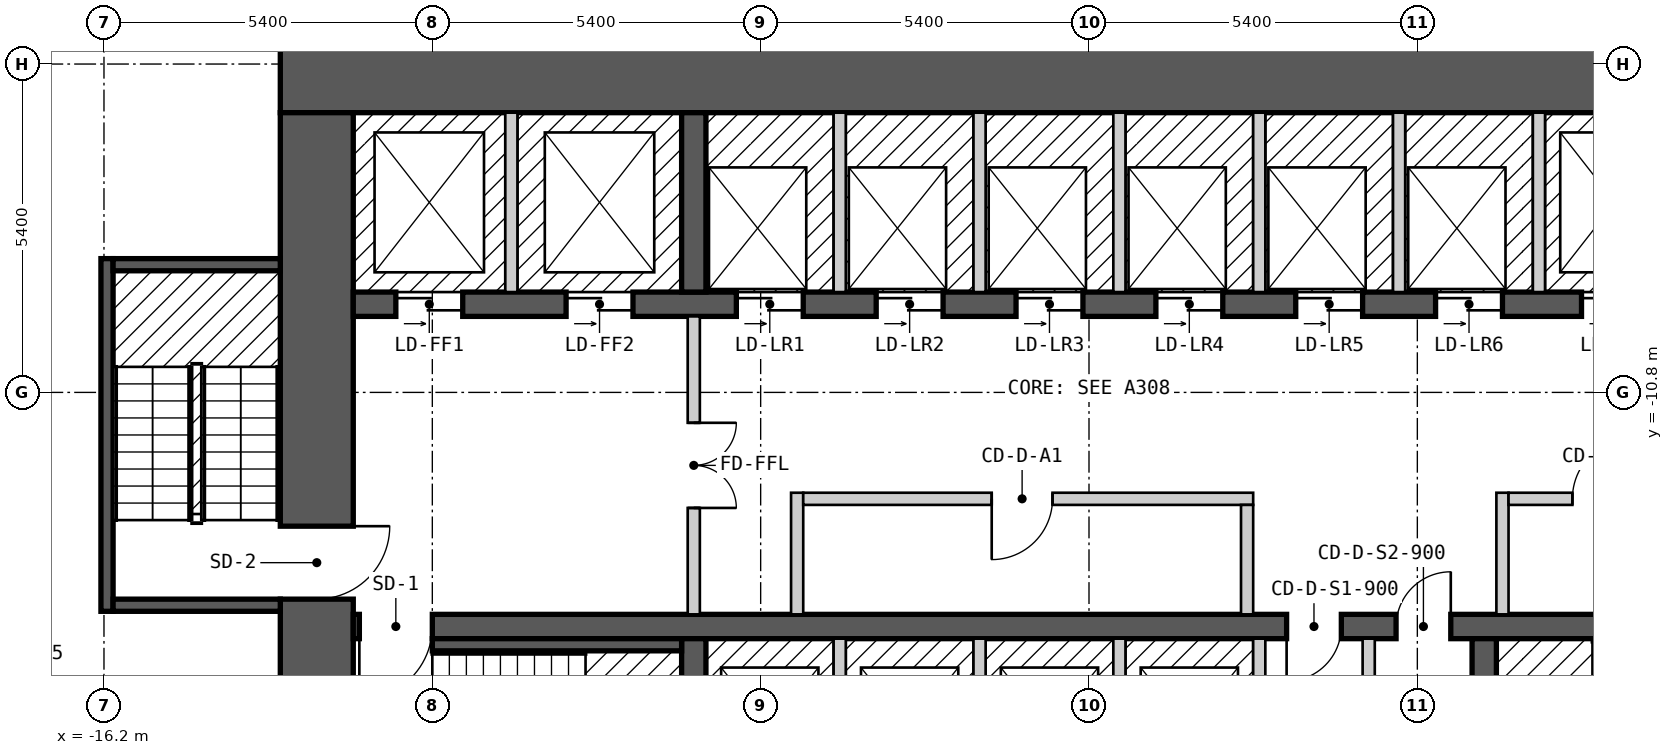
"""IFC4 building model, lengths in metres.
Left out: names, types, materials, properties, quantities, classifications, styles, units other than length and angle.
Written with IfcOpenShell. Run it as: python <this file> out.ifc"""

import sys

from ifc_helpers import new_model, si_unit, direction, frame, frame_2d, origin, place, context, subcontext, project, spatial, rectangle, extrude, element, fill, save


model = new_model("IFC4")
c1 = context("Model", 3, precision=1e-05, world=origin(), true_north=direction((0.0, 1.0)))
c2 = subcontext(c1, "Body", "Model", "MODEL_VIEW")
j1 = project(units=[si_unit("LENGTHUNIT", "METRE"), si_unit("PLANEANGLEUNIT", "RADIAN")], contexts=[c1])
p1 = place(None, origin())
s1 = spatial("IfcSite", under=j1, at=p1, CompositionType="ELEMENT")
p2 = place(p1, origin())
s2 = spatial("IfcBuilding", under=s1, at=p2, CompositionType="ELEMENT")
p3 = place(p2, frame((0.0, 0.0, 19.8)))
s3 = spatial("IfcBuildingStorey", under=s2, at=p3, CompositionType="ELEMENT", Elevation=19.8)
p4 = place(p3, frame((-13.3, -5.6, 0.0), z_axis=(0.0, 0.0, 1.0), x_axis=(1.0, 0.0, 0.0)))
e1 = element("IfcWall", 1, at=p4, inside=s3, PredefinedType="SHEAR", context=c2, shape_type="SweptSolid", body=[
    extrude(rectangle(XDim=26.6, YDim=1.2, at=frame_2d((13.3, 0.0))), origin(), (0.0, 0.0, 1.0), 2.8),
])
p5 = place(p4, frame((23.65, 0.0, 0.0)))
e2 = element("IfcOpeningElement", 2, at=p5, cuts=e1, PredefinedType="OPENING", context=c2, shape_type="SweptSolid", body=[
    extrude(rectangle(XDim=1.2, YDim=2.1, at=frame_2d((0.6, 1.05))), frame((0.0, 0.61, 0.0), z_axis=(0.0, -1.0, 0.0), x_axis=(1.0, 0.0, 0.0)), (0.0, 0.0, 1.0), 1.22),
])
p6 = place(p3, frame((-12.7, -17.8, 0.0), z_axis=(0.0, 0.0, 1.0), x_axis=(0.0, 1.0, 0.0)))
e3 = element("IfcWall", 3, at=p6, inside=s3, PredefinedType="SHEAR", context=c2, shape_type="SweptSolid", body=[
    extrude(rectangle(XDim=11.6, YDim=1.2, at=frame_2d((5.8, 0.0))), origin(), (0.0, 0.0, 1.0), 2.8),
])
p7 = place(p6, frame((3.6, 0.0, 0.0)))
e4 = element("IfcOpeningElement", 4, at=p7, cuts=e3, PredefinedType="OPENING", context=c2, shape_type="SweptSolid", body=[
    extrude(rectangle(XDim=1.2, YDim=2.1, at=frame_2d((0.6, 1.05))), frame((0.0, 0.61, 0.0), z_axis=(0.0, -1.0, 0.0), x_axis=(1.0, 0.0, 0.0)), (0.0, 0.0, 1.0), 1.22),
])
p8 = place(p3, frame((-12.1, -14.65, 0.0), z_axis=(0.0, 0.0, 1.0), x_axis=(1.0, 0.0, 0.0)))
e5 = element("IfcWall", 5, at=p8, inside=s3, PredefinedType="SHEAR", context=c2, shape_type="SweptSolid", body=[
    extrude(rectangle(XDim=24.2, YDim=0.4, at=frame_2d((12.1, 0.0))), origin(), (0.0, 0.0, 1.0), 2.8),
])
p9 = place(p8, frame((1.3, 0.0, 0.0), z_axis=(0.0, 0.0, 1.0), x_axis=(-1.0, 0.0, 0.0)))
e6 = element("IfcOpeningElement", 6, at=p9, cuts=e5, PredefinedType="OPENING", context=c2, shape_type="SweptSolid", body=[
    extrude(rectangle(XDim=1.2, YDim=2.1, at=frame_2d((0.6, 1.05))), frame((0.0, 0.21, 0.0), z_axis=(0.0, -1.0, 0.0), x_axis=(1.0, 0.0, 0.0)), (0.0, 0.0, 1.0), 0.42),
])
p10 = place(p8, frame((24.15, 0.0, 0.0), z_axis=(0.0, 0.0, 1.0), x_axis=(-1.0, 0.0, 0.0)))
e7 = element("IfcOpeningElement", 7, at=p10, cuts=e5, PredefinedType="OPENING", context=c2, shape_type="SweptSolid", body=[
    extrude(rectangle(XDim=1.2, YDim=2.1, at=frame_2d((0.6, 1.05))), frame((0.0, 0.21, 0.0), z_axis=(0.0, -1.0, 0.0), x_axis=(1.0, 0.0, 0.0)), (0.0, 0.0, 1.0), 0.42),
])
p11 = place(p8, frame((16.25, 0.0, 0.0), z_axis=(0.0, 0.0, 1.0), x_axis=(-1.0, 0.0, 0.0)))
e8 = element("IfcOpeningElement", 8, at=p11, cuts=e5, PredefinedType="OPENING", context=c2, shape_type="SweptSolid", body=[
    extrude(rectangle(XDim=0.9, YDim=2.1, at=frame_2d((0.45, 1.05))), frame((0.0, 0.21, 0.0), z_axis=(0.0, -1.0, 0.0), x_axis=(1.0, 0.0, 0.0)), (0.0, 0.0, 1.0), 0.42),
])
p12 = place(p8, frame((18.05, 0.0, 0.0), z_axis=(0.0, 0.0, 1.0), x_axis=(-1.0, 0.0, 0.0)))
e9 = element("IfcOpeningElement", 9, at=p12, cuts=e5, PredefinedType="OPENING", context=c2, shape_type="SweptSolid", body=[
    extrude(rectangle(XDim=0.9, YDim=2.1, at=frame_2d((0.45, 1.05))), frame((0.0, 0.21, 0.0), z_axis=(0.0, -1.0, 0.0), x_axis=(1.0, 0.0, 0.0)), (0.0, 0.0, 1.0), 0.42),
])
p13 = place(p3, frame((-12.1, -9.35, 0.0), z_axis=(0.0, 0.0, 1.0), x_axis=(1.0, 0.0, 0.0)))
e10 = element("IfcWall", 10, at=p13, inside=s3, PredefinedType="SHEAR", context=c2, shape_type="SweptSolid", body=[
    extrude(rectangle(XDim=22.3, YDim=0.4, at=frame_2d((11.15, 0.0))), origin(), (0.0, 0.0, 1.0), 2.8),
])
p14 = place(p13, frame((0.7, 0.0, 0.0)))
e11 = element("IfcOpeningElement", 11, at=p14, cuts=e10, PredefinedType="OPENING", context=c2, shape_type="SweptSolid", body=[
    extrude(rectangle(XDim=1.1, YDim=2.1, at=frame_2d((0.55, 1.05))), frame((0.0, 0.21, 0.0), z_axis=(0.0, -1.0, 0.0), x_axis=(1.0, 0.0, 0.0)), (0.0, 0.0, 1.0), 0.42),
])
p15 = place(p13, frame((3.5, 0.0, 0.0)))
e12 = element("IfcOpeningElement", 12, at=p15, cuts=e10, PredefinedType="OPENING", context=c2, shape_type="SweptSolid", body=[
    extrude(rectangle(XDim=1.1, YDim=2.1, at=frame_2d((0.55, 1.05))), frame((0.0, 0.21, 0.0), z_axis=(0.0, -1.0, 0.0), x_axis=(1.0, 0.0, 0.0)), (0.0, 0.0, 1.0), 0.42),
])
p16 = place(p13, frame((6.3, 0.0, 0.0)))
e13 = element("IfcOpeningElement", 13, at=p16, cuts=e10, PredefinedType="OPENING", context=c2, shape_type="SweptSolid", body=[
    extrude(rectangle(XDim=1.1, YDim=2.1, at=frame_2d((0.55, 1.05))), frame((0.0, 0.21, 0.0), z_axis=(0.0, -1.0, 0.0), x_axis=(1.0, 0.0, 0.0)), (0.0, 0.0, 1.0), 0.42),
])
p17 = place(p13, frame((8.6, 0.0, 0.0)))
e14 = element("IfcOpeningElement", 14, at=p17, cuts=e10, PredefinedType="OPENING", context=c2, shape_type="SweptSolid", body=[
    extrude(rectangle(XDim=1.1, YDim=2.1, at=frame_2d((0.55, 1.05))), frame((0.0, 0.21, 0.0), z_axis=(0.0, -1.0, 0.0), x_axis=(1.0, 0.0, 0.0)), (0.0, 0.0, 1.0), 0.42),
])
p18 = place(p13, frame((10.9, 0.0, 0.0)))
e15 = element("IfcOpeningElement", 15, at=p18, cuts=e10, PredefinedType="OPENING", context=c2, shape_type="SweptSolid", body=[
    extrude(rectangle(XDim=1.1, YDim=2.1, at=frame_2d((0.55, 1.05))), frame((0.0, 0.21, 0.0), z_axis=(0.0, -1.0, 0.0), x_axis=(1.0, 0.0, 0.0)), (0.0, 0.0, 1.0), 0.42),
])
p19 = place(p13, frame((13.2, 0.0, 0.0)))
e16 = element("IfcOpeningElement", 16, at=p19, cuts=e10, PredefinedType="OPENING", context=c2, shape_type="SweptSolid", body=[
    extrude(rectangle(XDim=1.1, YDim=2.1, at=frame_2d((0.55, 1.05))), frame((0.0, 0.21, 0.0), z_axis=(0.0, -1.0, 0.0), x_axis=(1.0, 0.0, 0.0)), (0.0, 0.0, 1.0), 0.42),
])
p20 = place(p13, frame((15.5, 0.0, 0.0)))
e17 = element("IfcOpeningElement", 17, at=p20, cuts=e10, PredefinedType="OPENING", context=c2, shape_type="SweptSolid", body=[
    extrude(rectangle(XDim=1.1, YDim=2.1, at=frame_2d((0.55, 1.05))), frame((0.0, 0.21, 0.0), z_axis=(0.0, -1.0, 0.0), x_axis=(1.0, 0.0, 0.0)), (0.0, 0.0, 1.0), 0.42),
])
p21 = place(p13, frame((17.8, 0.0, 0.0)))
e18 = element("IfcOpeningElement", 18, at=p21, cuts=e10, PredefinedType="OPENING", context=c2, shape_type="SweptSolid", body=[
    extrude(rectangle(XDim=1.1, YDim=2.1, at=frame_2d((0.55, 1.05))), frame((0.0, 0.21, 0.0), z_axis=(0.0, -1.0, 0.0), x_axis=(1.0, 0.0, 0.0)), (0.0, 0.0, 1.0), 0.42),
])
p22 = place(p13, frame((20.2, 0.0, 0.0)))
e19 = element("IfcOpeningElement", 19, at=p22, cuts=e10, PredefinedType="OPENING", context=c2, shape_type="SweptSolid", body=[
    extrude(rectangle(XDim=1.1, YDim=2.1, at=frame_2d((0.55, 1.05))), frame((0.0, 0.21, 0.0), z_axis=(0.0, -1.0, 0.0), x_axis=(1.0, 0.0, 0.0)), (0.0, 0.0, 1.0), 0.42),
])
for number, where, z_axis, x_axis in (
    (20, (-6.5, -17.8, 0.0), (0.0, 0.0, 1.0), (0.0, 1.0, 0.0)),
    (21, (6.5, -17.8, 0.0), (0.0, 0.0, 1.0), (0.0, 1.0, 0.0)),
    (22, (-6.5, -9.15, 0.0), (0.0, 0.0, 1.0), (0.0, 1.0, 0.0)),
):
    element("IfcWall", number, at=place(p3, frame(where, z_axis=z_axis, x_axis=x_axis)), inside=s3, PredefinedType="SHEAR", context=c2, shape_type="SweptSolid", body=[
        extrude(rectangle(XDim=2.95, YDim=0.4, at=frame_2d((1.475, 0.0))), origin(), (0.0, 0.0, 1.0), 2.8),
    ])
p23 = place(p3, frame((-16.15, -14.4, 0.0), z_axis=(0.0, 0.0, 1.0), x_axis=(0.0, 1.0, 0.0)))
e23 = element("IfcWall", 23, at=p23, inside=s3, PredefinedType="SOLIDWALL", context=c2, shape_type="SweptSolid", body=[
    extrude(rectangle(XDim=5.8, YDim=0.2, at=frame_2d((2.9, 0.0))), origin(), (0.0, 0.0, 1.0), 2.8),
])
for number, where, z_axis, x_axis in (
    (24, (-16.05, -14.3, 0.0), (0.0, 0.0, 1.0), (1.0, 0.0, 0.0)),
    (25, (-16.05, -8.7, 0.0), (0.0, 0.0, 1.0), (1.0, 0.0, 0.0)),
):
    element("IfcWall", number, at=place(p3, frame(where, z_axis=z_axis, x_axis=x_axis)), inside=s3, PredefinedType="SOLIDWALL", context=c2, shape_type="SweptSolid", body=[
        extrude(rectangle(XDim=2.75, YDim=0.2, at=frame_2d((1.375, 0.0))), origin(), (0.0, 0.0, 1.0), 2.8),
    ])
p24 = place(p3, frame((-10.8, -14.95, 0.0), z_axis=(0.0, 0.0, 1.0), x_axis=(1.0, 0.0, 0.0)))
e26 = element("IfcWall", 26, at=p24, inside=s3, PredefinedType="SOLIDWALL", context=c2, shape_type="SweptSolid", body=[
    extrude(rectangle(XDim=4.1, YDim=0.2, at=frame_2d((2.05, 0.0))), origin(), (0.0, 0.0, 1.0), 2.8),
])
p25 = place(p3, frame((-9.5, -9.15, 0.0), z_axis=(0.0, 0.0, 1.0), x_axis=(0.0, 1.0, 0.0)))
e27 = element("IfcWall", 27, at=p25, inside=s3, PredefinedType="SOLIDWALL", context=c2, shape_type="SweptSolid", body=[
    extrude(rectangle(XDim=2.95, YDim=0.2, at=frame_2d((1.475, 0.0))), origin(), (0.0, 0.0, 1.0), 2.8),
])
p26 = place(p3, frame((-6.5, -14.45, 0.0), z_axis=(0.0, 0.0, 1.0), x_axis=(0.0, 1.0, 0.0)))
e28 = element("IfcWall", 28, at=p26, inside=s3, PredefinedType="PARTITIONING", context=c2, shape_type="SweptSolid", body=[
    extrude(rectangle(XDim=4.9, YDim=0.2, at=frame_2d((2.45, 0.0))), origin(), (0.0, 0.0, 1.0), 2.8),
])
p27 = place(p26, frame((3.15, 0.0, 0.0), z_axis=(0.0, 0.0, 1.0), x_axis=(-1.0, 0.0, 0.0)))
e29 = element("IfcOpeningElement", 29, at=p27, cuts=e28, PredefinedType="OPENING", context=c2, shape_type="SweptSolid", body=[
    extrude(rectangle(XDim=1.4, YDim=2.1, at=frame_2d((0.7, 1.05))), frame((0.0, 0.11, 0.0), z_axis=(0.0, -1.0, 0.0), x_axis=(1.0, 0.0, 0.0)), (0.0, 0.0, 1.0), 0.22),
])
p28 = place(p3, frame((-4.8, -14.45, 0.0), z_axis=(0.0, 0.0, 1.0), x_axis=(0.0, 1.0, 0.0)))
e30 = element("IfcWall", 30, at=p28, inside=s3, PredefinedType="PARTITIONING", context=c2, shape_type="SweptSolid", body=[
    extrude(rectangle(XDim=2.0, YDim=0.2, at=frame_2d((1.0, 0.0))), origin(), (0.0, 0.0, 1.0), 2.8),
])
p29 = place(p3, frame((-4.7, -12.55, 0.0), z_axis=(0.0, 0.0, 1.0), x_axis=(1.0, 0.0, 0.0)))
e31 = element("IfcWall", 31, at=p29, inside=s3, PredefinedType="PARTITIONING", context=c2, shape_type="SweptSolid", body=[
    extrude(rectangle(XDim=7.4, YDim=0.2, at=frame_2d((3.7, 0.0))), origin(), (0.0, 0.0, 1.0), 2.8),
])
p30 = place(p29, frame((4.1, 0.0, 0.0), z_axis=(0.0, 0.0, 1.0), x_axis=(-1.0, 0.0, 0.0)))
e32 = element("IfcOpeningElement", 32, at=p30, cuts=e31, PredefinedType="OPENING", context=c2, shape_type="SweptSolid", body=[
    extrude(rectangle(XDim=1.0, YDim=2.1, at=frame_2d((0.5, 1.05))), frame((0.0, 0.11, 0.0), z_axis=(0.0, -1.0, 0.0), x_axis=(1.0, 0.0, 0.0)), (0.0, 0.0, 1.0), 0.22),
])
for number, where, z_axis, x_axis in (
    (33, (-4.1, -17.8, 0.0), (0.0, 0.0, 1.0), (0.0, 1.0, 0.0)),
    (34, (-4.1, -9.15, 0.0), (0.0, 0.0, 1.0), (0.0, 1.0, 0.0)),
    (35, (-1.8, -17.8, 0.0), (0.0, 0.0, 1.0), (0.0, 1.0, 0.0)),
    (36, (-1.8, -9.15, 0.0), (0.0, 0.0, 1.0), (0.0, 1.0, 0.0)),
    (37, (0.5, -17.8, 0.0), (0.0, 0.0, 1.0), (0.0, 1.0, 0.0)),
    (38, (0.5, -9.15, 0.0), (0.0, 0.0, 1.0), (0.0, 1.0, 0.0)),
):
    element("IfcWall", number, at=place(p3, frame(where, z_axis=z_axis, x_axis=x_axis)), inside=s3, PredefinedType="SOLIDWALL", context=c2, shape_type="SweptSolid", body=[
        extrude(rectangle(XDim=2.95, YDim=0.2, at=frame_2d((1.475, 0.0))), origin(), (0.0, 0.0, 1.0), 2.8),
    ])
p31 = place(p3, frame((2.6, -14.45, 0.0), z_axis=(0.0, 0.0, 1.0), x_axis=(0.0, 1.0, 0.0)))
e39 = element("IfcWall", 39, at=p31, inside=s3, PredefinedType="PARTITIONING", context=c2, shape_type="SweptSolid", body=[
    extrude(rectangle(XDim=1.8, YDim=0.2, at=frame_2d((0.9, 0.0))), origin(), (0.0, 0.0, 1.0), 2.8),
])
for number, where, z_axis, x_axis in (
    (40, (2.8, -17.8, 0.0), (0.0, 0.0, 1.0), (0.0, 1.0, 0.0)),
    (41, (2.8, -9.15, 0.0), (0.0, 0.0, 1.0), (0.0, 1.0, 0.0)),
):
    element("IfcWall", number, at=place(p3, frame(where, z_axis=z_axis, x_axis=x_axis)), inside=s3, PredefinedType="SOLIDWALL", context=c2, shape_type="SweptSolid", body=[
        extrude(rectangle(XDim=2.95, YDim=0.2, at=frame_2d((1.475, 0.0))), origin(), (0.0, 0.0, 1.0), 2.8),
    ])
p32 = place(p3, frame((4.6, -17.8, 0.0), z_axis=(0.0, 0.0, 1.0), x_axis=(0.0, 1.0, 0.0)))
e42 = element("IfcWall", 42, at=p32, inside=s3, PredefinedType="PARTITIONING", context=c2, shape_type="SweptSolid", body=[
    extrude(rectangle(XDim=2.95, YDim=0.2, at=frame_2d((1.475, 0.0))), origin(), (0.0, 0.0, 1.0), 2.8),
])
p33 = place(p3, frame((5.1, -9.15, 0.0), z_axis=(0.0, 0.0, 1.0), x_axis=(0.0, 1.0, 0.0)))
e43 = element("IfcWall", 43, at=p33, inside=s3, PredefinedType="SOLIDWALL", context=c2, shape_type="SweptSolid", body=[
    extrude(rectangle(XDim=2.95, YDim=0.2, at=frame_2d((1.475, 0.0))), origin(), (0.0, 0.0, 1.0), 2.8),
])
p34 = place(p3, frame((6.8, -14.45, 0.0), z_axis=(0.0, 0.0, 1.0), x_axis=(0.0, 1.0, 0.0)))
e44 = element("IfcWall", 44, at=p34, inside=s3, PredefinedType="PARTITIONING", context=c2, shape_type="SweptSolid", body=[
    extrude(rectangle(XDim=2.0, YDim=0.2, at=frame_2d((1.0, 0.0))), origin(), (0.0, 0.0, 1.0), 2.8),
])
p35 = place(p3, frame((6.9, -12.55, 0.0), z_axis=(0.0, 0.0, 1.0), x_axis=(1.0, 0.0, 0.0)))
e45 = element("IfcWall", 45, at=p35, inside=s3, PredefinedType="PARTITIONING", context=c2, shape_type="SweptSolid", body=[
    extrude(rectangle(XDim=3.3, YDim=0.2, at=frame_2d((1.65, 0.0))), origin(), (0.0, 0.0, 1.0), 2.8),
])
p36 = place(p35, frame((2.05, 0.0, 0.0), z_axis=(0.0, 0.0, 1.0), x_axis=(-1.0, 0.0, 0.0)))
e46 = element("IfcOpeningElement", 46, at=p36, cuts=e45, PredefinedType="OPENING", context=c2, shape_type="SweptSolid", body=[
    extrude(rectangle(XDim=1.0, YDim=2.1, at=frame_2d((0.5, 1.05))), frame((0.0, 0.11, 0.0), z_axis=(0.0, -1.0, 0.0), x_axis=(1.0, 0.0, 0.0)), (0.0, 0.0, 1.0), 0.22),
])
p37 = place(p3, frame((7.4, -9.15, 0.0), z_axis=(0.0, 0.0, 1.0), x_axis=(0.0, 1.0, 0.0)))
e47 = element("IfcWall", 47, at=p37, inside=s3, PredefinedType="SOLIDWALL", context=c2, shape_type="SweptSolid", body=[
    extrude(rectangle(XDim=2.95, YDim=0.2, at=frame_2d((1.475, 0.0))), origin(), (0.0, 0.0, 1.0), 2.8),
])
p38 = place(p14, origin())
e48 = element("IfcDoor", 48, at=p38, inside=s3, OperationType="DOUBLE_DOOR_SLIDING", PredefinedType="DOOR", context=c2, shape_type="SweptSolid", body=[
    extrude(rectangle(XDim=1.1, YDim=2.1, at=frame_2d((0.55, 1.05))), frame((0.0, 0.025, 0.0), z_axis=(0.0, -1.0, 0.0), x_axis=(1.0, 0.0, 0.0)), (0.0, 0.0, 1.0), 0.05),
])
fill(e11, e48)
p39 = place(p15, origin())
e49 = element("IfcDoor", 49, at=p39, inside=s3, OperationType="DOUBLE_DOOR_SLIDING", PredefinedType="DOOR", context=c2, shape_type="SweptSolid", body=[
    extrude(rectangle(XDim=1.1, YDim=2.1, at=frame_2d((0.55, 1.05))), frame((0.0, 0.025, 0.0), z_axis=(0.0, -1.0, 0.0), x_axis=(1.0, 0.0, 0.0)), (0.0, 0.0, 1.0), 0.05),
])
fill(e12, e49)
p40 = place(p16, origin())
e50 = element("IfcDoor", 50, at=p40, inside=s3, OperationType="DOUBLE_DOOR_SLIDING", PredefinedType="DOOR", context=c2, shape_type="SweptSolid", body=[
    extrude(rectangle(XDim=1.1, YDim=2.1, at=frame_2d((0.55, 1.05))), frame((0.0, 0.025, 0.0), z_axis=(0.0, -1.0, 0.0), x_axis=(1.0, 0.0, 0.0)), (0.0, 0.0, 1.0), 0.05),
])
fill(e13, e50)
p41 = place(p17, origin())
e51 = element("IfcDoor", 51, at=p41, inside=s3, OperationType="DOUBLE_DOOR_SLIDING", PredefinedType="DOOR", context=c2, shape_type="SweptSolid", body=[
    extrude(rectangle(XDim=1.1, YDim=2.1, at=frame_2d((0.55, 1.05))), frame((0.0, 0.025, 0.0), z_axis=(0.0, -1.0, 0.0), x_axis=(1.0, 0.0, 0.0)), (0.0, 0.0, 1.0), 0.05),
])
fill(e14, e51)
p42 = place(p18, origin())
e52 = element("IfcDoor", 52, at=p42, inside=s3, OperationType="DOUBLE_DOOR_SLIDING", PredefinedType="DOOR", context=c2, shape_type="SweptSolid", body=[
    extrude(rectangle(XDim=1.1, YDim=2.1, at=frame_2d((0.55, 1.05))), frame((0.0, 0.025, 0.0), z_axis=(0.0, -1.0, 0.0), x_axis=(1.0, 0.0, 0.0)), (0.0, 0.0, 1.0), 0.05),
])
fill(e15, e52)
p43 = place(p19, origin())
e53 = element("IfcDoor", 53, at=p43, inside=s3, OperationType="DOUBLE_DOOR_SLIDING", PredefinedType="DOOR", context=c2, shape_type="SweptSolid", body=[
    extrude(rectangle(XDim=1.1, YDim=2.1, at=frame_2d((0.55, 1.05))), frame((0.0, 0.025, 0.0), z_axis=(0.0, -1.0, 0.0), x_axis=(1.0, 0.0, 0.0)), (0.0, 0.0, 1.0), 0.05),
])
fill(e16, e53)
p44 = place(p20, origin())
e54 = element("IfcDoor", 54, at=p44, inside=s3, OperationType="DOUBLE_DOOR_SLIDING", PredefinedType="DOOR", context=c2, shape_type="SweptSolid", body=[
    extrude(rectangle(XDim=1.1, YDim=2.1, at=frame_2d((0.55, 1.05))), frame((0.0, 0.025, 0.0), z_axis=(0.0, -1.0, 0.0), x_axis=(1.0, 0.0, 0.0)), (0.0, 0.0, 1.0), 0.05),
])
fill(e17, e54)
p45 = place(p21, origin())
e55 = element("IfcDoor", 55, at=p45, inside=s3, OperationType="DOUBLE_DOOR_SLIDING", PredefinedType="DOOR", context=c2, shape_type="SweptSolid", body=[
    extrude(rectangle(XDim=1.1, YDim=2.1, at=frame_2d((0.55, 1.05))), frame((0.0, 0.025, 0.0), z_axis=(0.0, -1.0, 0.0), x_axis=(1.0, 0.0, 0.0)), (0.0, 0.0, 1.0), 0.05),
])
fill(e18, e55)
p46 = place(p22, origin())
e56 = element("IfcDoor", 56, at=p46, inside=s3, OperationType="DOUBLE_DOOR_SLIDING", PredefinedType="DOOR", context=c2, shape_type="SweptSolid", body=[
    extrude(rectangle(XDim=1.1, YDim=2.1, at=frame_2d((0.55, 1.05))), frame((0.0, 0.025, 0.0), z_axis=(0.0, -1.0, 0.0), x_axis=(1.0, 0.0, 0.0)), (0.0, 0.0, 1.0), 0.05),
])
fill(e19, e56)
p47 = place(p9, origin())
e57 = element("IfcDoor", 57, at=p47, inside=s3, OperationType="SINGLE_SWING_RIGHT", PredefinedType="DOOR", context=c2, shape_type="SweptSolid", body=[
    extrude(rectangle(XDim=1.2, YDim=2.1, at=frame_2d((0.6, 1.05))), frame((0.0, 0.025, 0.0), z_axis=(0.0, -1.0, 0.0), x_axis=(1.0, 0.0, 0.0)), (0.0, 0.0, 1.0), 0.05),
])
fill(e6, e57)
p48 = place(p7, origin())
e58 = element("IfcDoor", 58, at=p48, inside=s3, OperationType="SINGLE_SWING_RIGHT", PredefinedType="DOOR", context=c2, shape_type="SweptSolid", body=[
    extrude(rectangle(XDim=1.2, YDim=2.1, at=frame_2d((0.6, 1.05))), frame((0.0, 0.025, 0.0), z_axis=(0.0, -1.0, 0.0), x_axis=(1.0, 0.0, 0.0)), (0.0, 0.0, 1.0), 0.05),
])
fill(e4, e58)
p49 = place(p27, origin())
e59 = element("IfcDoor", 59, at=p49, inside=s3, OperationType="DOUBLE_DOOR_SINGLE_SWING", PredefinedType="DOOR", context=c2, shape_type="SweptSolid", body=[
    extrude(rectangle(XDim=1.4, YDim=2.1, at=frame_2d((0.7, 1.05))), frame((0.0, 0.025, 0.0), z_axis=(0.0, -1.0, 0.0), x_axis=(1.0, 0.0, 0.0)), (0.0, 0.0, 1.0), 0.05),
])
fill(e29, e59)
p50 = place(p30, origin())
e60 = element("IfcDoor", 60, at=p50, inside=s3, OperationType="SINGLE_SWING_RIGHT", PredefinedType="DOOR", context=c2, shape_type="SweptSolid", body=[
    extrude(rectangle(XDim=1.0, YDim=2.1, at=frame_2d((0.5, 1.05))), frame((0.0, 0.025, 0.0), z_axis=(0.0, -1.0, 0.0), x_axis=(1.0, 0.0, 0.0)), (0.0, 0.0, 1.0), 0.05),
])
fill(e32, e60)
p51 = place(p36, origin())
e61 = element("IfcDoor", 61, at=p51, inside=s3, OperationType="SINGLE_SWING_LEFT", PredefinedType="DOOR", context=c2, shape_type="SweptSolid", body=[
    extrude(rectangle(XDim=1.0, YDim=2.1, at=frame_2d((0.5, 1.05))), frame((0.0, 0.025, 0.0), z_axis=(0.0, -1.0, 0.0), x_axis=(1.0, 0.0, 0.0)), (0.0, 0.0, 1.0), 0.05),
])
fill(e46, e61)
p52 = place(p11, origin())
e62 = element("IfcDoor", 62, at=p52, inside=s3, OperationType="SINGLE_SWING_RIGHT", PredefinedType="DOOR", context=c2, shape_type="SweptSolid", body=[
    extrude(rectangle(XDim=0.9, YDim=2.1, at=frame_2d((0.45, 1.05))), frame((0.0, 0.025, 0.0), z_axis=(0.0, -1.0, 0.0), x_axis=(1.0, 0.0, 0.0)), (0.0, 0.0, 1.0), 0.05),
])
fill(e8, e62)
p53 = place(p12, origin())
e63 = element("IfcDoor", 63, at=p53, inside=s3, OperationType="SINGLE_SWING_LEFT", PredefinedType="DOOR", context=c2, shape_type="SweptSolid", body=[
    extrude(rectangle(XDim=0.9, YDim=2.1, at=frame_2d((0.45, 1.05))), frame((0.0, 0.025, 0.0), z_axis=(0.0, -1.0, 0.0), x_axis=(1.0, 0.0, 0.0)), (0.0, 0.0, 1.0), 0.05),
])
fill(e9, e63)
save(model, sys.argv[1])
